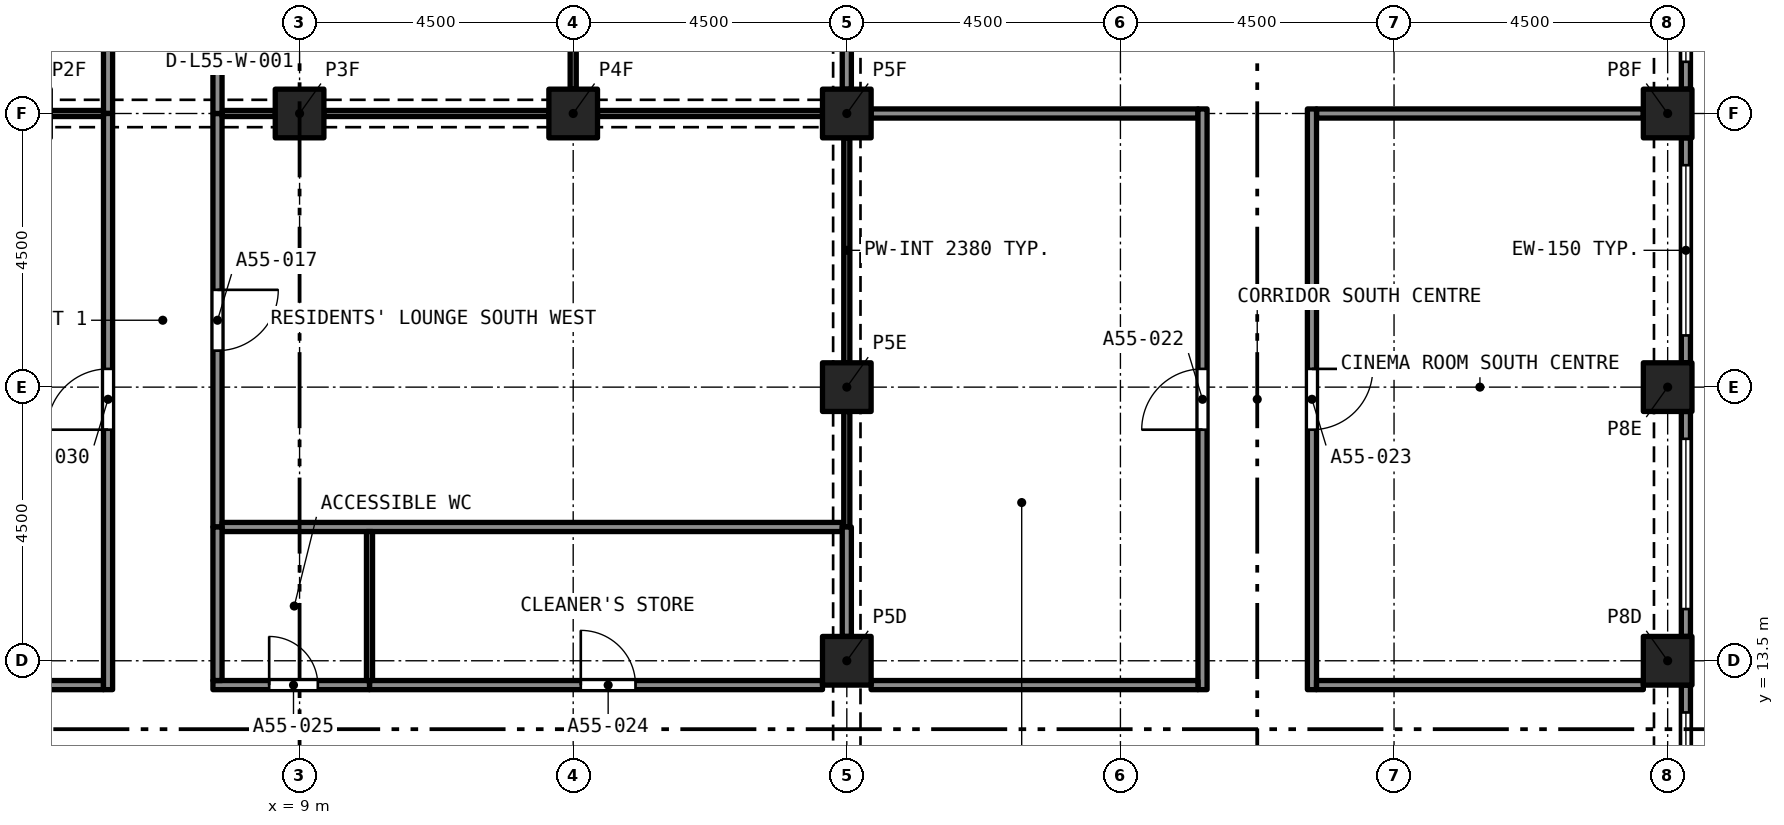
"""IFC4 building model, lengths in metres.
Left out: names, types, materials, properties, quantities, classifications, styles, units other than length and angle.
Written with IfcOpenShell. Run it as: python <this file> out.ifc"""

import sys

from ifc_helpers import new_model, si_unit, direction, frame, frame_2d, origin, origin_2d, place, context, subcontext, project, spatial, rectangle, extrude, element, fill, save


model = new_model("IFC4")
c1 = context("Model", 3, precision=1e-05, world=origin(), true_north=direction((0.0, 1.0)))
c2 = subcontext(c1, "Body", "Model", "MODEL_VIEW")
j1 = project(units=[si_unit("LENGTHUNIT", "METRE"), si_unit("PLANEANGLEUNIT", "RADIAN")], contexts=[c1])
p1 = place(None, origin())
s1 = spatial("IfcSite", under=j1, at=p1, CompositionType="ELEMENT")
p2 = place(p1, origin())
s2 = spatial("IfcBuilding", under=s1, at=p2, CompositionType="ELEMENT")
p3 = place(p2, frame((0.0, 0.0, 198.7)))
s3 = spatial("IfcBuildingStorey", under=s2, at=p3, CompositionType="ELEMENT", Elevation=198.7)
for number, where, z_axis, x_axis in (
    (1, (18.0, 13.5, 0.0), (0.0, 0.0, 1.0), (1.0, 0.0, 0.0)),
    (2, (31.5, 13.5, 0.0), (0.0, 0.0, 1.0), (1.0, 0.0, 0.0)),
    (3, (18.0, 18.0, 0.0), (0.0, 0.0, 1.0), (1.0, 0.0, 0.0)),
    (4, (31.5, 18.0, 0.0), (0.0, 0.0, 1.0), (1.0, 0.0, 0.0)),
    (5, (9.0, 22.5, 0.0), (0.0, 0.0, 1.0), (1.0, 0.0, 0.0)),
    (6, (13.5, 22.5, 0.0), (0.0, 0.0, 1.0), (1.0, 0.0, 0.0)),
    (7, (18.0, 22.5, 0.0), (0.0, 0.0, 1.0), (1.0, 0.0, 0.0)),
    (8, (31.5, 22.5, 0.0), (0.0, 0.0, 1.0), (1.0, 0.0, 0.0)),
):
    element("IfcColumn", number, at=place(p3, frame(where, z_axis=z_axis, x_axis=x_axis)), inside=s3, PredefinedType="COLUMN", context=c2, shape_type="SweptSolid", body=[
        extrude(rectangle(XDim=0.8, YDim=0.8, at=origin_2d()), origin(), (0.0, 0.0, 1.0), 3.2),
    ])
p4 = place(p3, frame((31.8, 13.1, 0.0), z_axis=(0.0, 0.0, 1.0), x_axis=(0.0, -1.0, 0.0)))
e9 = element("IfcWall", 9, at=p4, inside=s3, PredefinedType="SOLIDWALL", context=c2, shape_type="SweptSolid", body=[
    extrude(rectangle(XDim=3.7, YDim=0.15, at=frame_2d((1.85, 0.0))), origin(), (0.0, 0.0, 1.0), 3.2),
])
p5 = place(p4, frame((0.45, 0.0, 0.45)))
e10 = element("IfcOpeningElement", 10, at=p5, cuts=e9, PredefinedType="OPENING", context=c2, shape_type="SweptSolid", body=[
    extrude(rectangle(XDim=2.8, YDim=1.95, at=frame_2d((1.4, 0.975))), frame((0.0, 0.085, 0.0), z_axis=(0.0, -1.0, 0.0), x_axis=(1.0, 0.0, 0.0)), (0.0, 0.0, 1.0), 0.17),
])
p6 = place(p3, frame((31.8, 17.6, 0.0), z_axis=(0.0, 0.0, 1.0), x_axis=(0.0, -1.0, 0.0)))
e11 = element("IfcWall", 11, at=p6, inside=s3, PredefinedType="SOLIDWALL", context=c2, shape_type="SweptSolid", body=[
    extrude(rectangle(XDim=3.7, YDim=0.15, at=frame_2d((1.85, 0.0))), origin(), (0.0, 0.0, 1.0), 3.2),
])
p7 = place(p6, frame((0.45, 0.0, 0.45)))
e12 = element("IfcOpeningElement", 12, at=p7, cuts=e11, PredefinedType="OPENING", context=c2, shape_type="SweptSolid", body=[
    extrude(rectangle(XDim=2.8, YDim=1.95, at=frame_2d((1.4, 0.975))), frame((0.0, 0.085, 0.0), z_axis=(0.0, -1.0, 0.0), x_axis=(1.0, 0.0, 0.0)), (0.0, 0.0, 1.0), 0.17),
])
p8 = place(p3, frame((31.8, 22.1, 0.0), z_axis=(0.0, 0.0, 1.0), x_axis=(0.0, -1.0, 0.0)))
e13 = element("IfcWall", 13, at=p8, inside=s3, PredefinedType="SOLIDWALL", context=c2, shape_type="SweptSolid", body=[
    extrude(rectangle(XDim=3.7, YDim=0.15, at=frame_2d((1.85, 0.0))), origin(), (0.0, 0.0, 1.0), 3.2),
])
p9 = place(p8, frame((0.45, 0.0, 0.45)))
e14 = element("IfcOpeningElement", 14, at=p9, cuts=e13, PredefinedType="OPENING", context=c2, shape_type="SweptSolid", body=[
    extrude(rectangle(XDim=2.8, YDim=1.95, at=frame_2d((1.4, 0.975))), frame((0.0, 0.085, 0.0), z_axis=(0.0, -1.0, 0.0), x_axis=(1.0, 0.0, 0.0)), (0.0, 0.0, 1.0), 0.17),
])
p10 = place(p3, frame((31.8, 26.6, 0.0), z_axis=(0.0, 0.0, 1.0), x_axis=(0.0, -1.0, 0.0)))
e15 = element("IfcWall", 15, at=p10, inside=s3, PredefinedType="SOLIDWALL", context=c2, shape_type="SweptSolid", body=[
    extrude(rectangle(XDim=3.7, YDim=0.15, at=frame_2d((1.85, 0.0))), origin(), (0.0, 0.0, 1.0), 3.2),
])
p11 = place(p10, frame((0.45, 0.0, 0.45)))
e16 = element("IfcOpeningElement", 16, at=p11, cuts=e15, PredefinedType="OPENING", context=c2, shape_type="SweptSolid", body=[
    extrude(rectangle(XDim=2.8, YDim=1.95, at=frame_2d((1.4, 0.975))), frame((0.0, 0.085, 0.0), z_axis=(0.0, -1.0, 0.0), x_axis=(1.0, 0.0, 0.0)), (0.0, 0.0, 1.0), 0.17),
])
p12 = place(p3, frame((18.0, 18.4, 0.0), z_axis=(0.0, 0.0, 1.0), x_axis=(0.0, 1.0, 0.0)))
e17 = element("IfcWall", 17, at=p12, inside=s3, PredefinedType="PARTITIONING", context=c2, shape_type="SweptSolid", body=[
    extrude(rectangle(XDim=3.7, YDim=0.1, at=frame_2d((1.85, 0.0))), origin(), (0.0, 0.0, 1.0), 2.38),
])
p13 = place(p3, frame((18.0, 15.7, 0.0), z_axis=(0.0, 0.0, 1.0), x_axis=(0.0, 1.0, 0.0)))
e18 = element("IfcWall", 18, at=p13, inside=s3, PredefinedType="PARTITIONING", context=c2, shape_type="SweptSolid", body=[
    extrude(rectangle(XDim=1.9, YDim=0.1, at=frame_2d((0.95, 0.0))), origin(), (0.0, 0.0, 1.0), 2.38),
])
p14 = place(p3, frame((7.65, 22.5, 0.0), z_axis=(0.0, 0.0, 1.0), x_axis=(0.0, -1.0, 0.0)))
e19 = element("IfcWall", 19, at=p14, inside=s3, PredefinedType="PARTITIONING", context=c2, shape_type="SweptSolid", body=[
    extrude(rectangle(XDim=6.8, YDim=0.15, at=frame_2d((3.4, 0.0))), origin(), (0.0, 0.0, 1.0), 2.7),
])
p15 = place(p14, frame((2.9, 0.0, 0.0)))
e20 = element("IfcOpeningElement", 20, at=p15, cuts=e19, PredefinedType="OPENING", context=c2, shape_type="SweptSolid", body=[
    extrude(rectangle(XDim=1.0, YDim=2.1, at=frame_2d((0.5, 1.05))), frame((0.0, 0.085, 0.0), z_axis=(0.0, -1.0, 0.0), x_axis=(1.0, 0.0, 0.0)), (0.0, 0.0, 1.0), 0.17),
])
p16 = place(p3, frame((7.725, 22.5, 0.0), z_axis=(0.0, 0.0, 1.0), x_axis=(1.0, 0.0, 0.0)))
e21 = element("IfcWall", 21, at=p16, inside=s3, PredefinedType="PARTITIONING", context=c2, shape_type="SweptSolid", body=[
    extrude(rectangle(XDim=0.875, YDim=0.1, at=frame_2d((0.438, 0.0))), origin(), (0.0, 0.0, 1.0), 2.38),
])
for number, where, z_axis, x_axis in (
    (22, (9.4, 22.5, 0.0), (0.0, 0.0, 1.0), (1.0, 0.0, 0.0)),
    (23, (13.9, 22.5, 0.0), (0.0, 0.0, 1.0), (1.0, 0.0, 0.0)),
):
    element("IfcWall", number, at=place(p3, frame(where, z_axis=z_axis, x_axis=x_axis)), inside=s3, PredefinedType="PARTITIONING", context=c2, shape_type="SweptSolid", body=[
        extrude(rectangle(XDim=3.7, YDim=0.1, at=frame_2d((1.85, 0.0))), origin(), (0.0, 0.0, 1.0), 2.38),
    ])
p17 = place(p3, frame((7.725, 15.7, 0.0), z_axis=(0.0, 0.0, 1.0), x_axis=(1.0, 0.0, 0.0)))
e24 = element("IfcWall", 24, at=p17, inside=s3, PredefinedType="PARTITIONING", context=c2, shape_type="SweptSolid", body=[
    extrude(rectangle(XDim=10.2, YDim=0.15, at=frame_2d((5.1, 0.0))), origin(), (0.0, 0.0, 1.0), 2.7),
])
for number, where, z_axis, x_axis in (
    (25, (18.4, 22.5, 0.0), (0.0, 0.0, 1.0), (1.0, 0.0, 0.0)),
    (26, (25.725, 22.5, 0.0), (0.0, 0.0, 1.0), (1.0, 0.0, 0.0)),
):
    element("IfcWall", number, at=place(p3, frame(where, z_axis=z_axis, x_axis=x_axis)), inside=s3, PredefinedType="PARTITIONING", context=c2, shape_type="SweptSolid", body=[
        extrude(rectangle(XDim=5.375, YDim=0.15, at=frame_2d((2.688, 0.0))), origin(), (0.0, 0.0, 1.0), 2.7),
    ])
p18 = place(p3, frame((18.0, 22.9, 0.0), z_axis=(0.0, 0.0, 1.0), x_axis=(0.0, 1.0, 0.0)))
e27 = element("IfcWall", 27, at=p18, inside=s3, PredefinedType="PARTITIONING", context=c2, shape_type="SweptSolid", body=[
    extrude(rectangle(XDim=3.7, YDim=0.15, at=frame_2d((1.85, 0.0))), origin(), (0.0, 0.0, 1.0), 2.38),
])
p19 = place(p3, frame((23.85, 13.025, 0.0), z_axis=(0.0, 0.0, 1.0), x_axis=(0.0, 1.0, 0.0)))
e28 = element("IfcWall", 28, at=p19, inside=s3, PredefinedType="PARTITIONING", context=c2, shape_type="SweptSolid", body=[
    extrude(rectangle(XDim=9.55, YDim=0.15, at=frame_2d((4.775, 0.0))), origin(), (0.0, 0.0, 1.0), 2.7),
])
p20 = place(p19, frame((4.275, 0.0, 0.0)))
e29 = element("IfcOpeningElement", 29, at=p20, cuts=e28, PredefinedType="OPENING", context=c2, shape_type="SweptSolid", body=[
    extrude(rectangle(XDim=1.0, YDim=2.1, at=frame_2d((0.5, 1.05))), frame((0.0, 0.085, 0.0), z_axis=(0.0, -1.0, 0.0), x_axis=(1.0, 0.0, 0.0)), (0.0, 0.0, 1.0), 0.17),
])
p21 = place(p3, frame((25.65, 22.575, 0.0), z_axis=(0.0, 0.0, 1.0), x_axis=(0.0, -1.0, 0.0)))
e30 = element("IfcWall", 30, at=p21, inside=s3, PredefinedType="PARTITIONING", context=c2, shape_type="SweptSolid", body=[
    extrude(rectangle(XDim=9.55, YDim=0.15, at=frame_2d((4.775, 0.0))), origin(), (0.0, 0.0, 1.0), 2.7),
])
p22 = place(p21, frame((4.275, 0.0, 0.0)))
e31 = element("IfcOpeningElement", 31, at=p22, cuts=e30, PredefinedType="OPENING", context=c2, shape_type="SweptSolid", body=[
    extrude(rectangle(XDim=1.0, YDim=2.1, at=frame_2d((0.5, 1.05))), frame((0.0, 0.085, 0.0), z_axis=(0.0, -1.0, 0.0), x_axis=(1.0, 0.0, 0.0)), (0.0, 0.0, 1.0), 0.17),
])
for number, where, z_axis, x_axis in (
    (32, (18.4, 13.1, 0.0), (0.0, 0.0, 1.0), (1.0, 0.0, 0.0)),
    (33, (25.725, 13.1, 0.0), (0.0, 0.0, 1.0), (1.0, 0.0, 0.0)),
):
    element("IfcWall", number, at=place(p3, frame(where, z_axis=z_axis, x_axis=x_axis)), inside=s3, PredefinedType="PARTITIONING", context=c2, shape_type="SweptSolid", body=[
        extrude(rectangle(XDim=5.375, YDim=0.15, at=frame_2d((2.688, 0.0))), origin(), (0.0, 0.0, 1.0), 2.7),
    ])
p23 = place(p3, frame((10.15, 13.1, 0.0), z_axis=(0.0, 0.0, 1.0), x_axis=(1.0, 0.0, 0.0)))
e34 = element("IfcWall", 34, at=p23, inside=s3, PredefinedType="PARTITIONING", context=c2, shape_type="SweptSolid", body=[
    extrude(rectangle(XDim=7.45, YDim=0.15, at=frame_2d((3.725, 0.0))), origin(), (0.0, 0.0, 1.0), 2.7),
])
p24 = place(p23, frame((3.475, 0.0, 0.0)))
e35 = element("IfcOpeningElement", 35, at=p24, cuts=e34, PredefinedType="OPENING", context=c2, shape_type="SweptSolid", body=[
    extrude(rectangle(XDim=0.9, YDim=2.1, at=frame_2d((0.45, 1.05))), frame((0.0, 0.085, 0.0), z_axis=(0.0, -1.0, 0.0), x_axis=(1.0, 0.0, 0.0)), (0.0, 0.0, 1.0), 0.17),
])
p25 = place(p3, frame((7.575, 13.1, 0.0), z_axis=(0.0, 0.0, 1.0), x_axis=(1.0, 0.0, 0.0)))
e36 = element("IfcWall", 36, at=p25, inside=s3, PredefinedType="PARTITIONING", context=c2, shape_type="SweptSolid", body=[
    extrude(rectangle(XDim=2.575, YDim=0.15, at=frame_2d((1.288, 0.0))), origin(), (0.0, 0.0, 1.0), 2.7),
])
p26 = place(p25, frame((0.925, 0.0, 0.0)))
e37 = element("IfcOpeningElement", 37, at=p26, cuts=e36, PredefinedType="OPENING", context=c2, shape_type="SweptSolid", body=[
    extrude(rectangle(XDim=0.8, YDim=2.1, at=frame_2d((0.4, 1.05))), frame((0.0, 0.085, 0.0), z_axis=(0.0, -1.0, 0.0), x_axis=(1.0, 0.0, 0.0)), (0.0, 0.0, 1.0), 0.17),
])
p27 = place(p3, frame((0.4, 13.1, 0.0), z_axis=(0.0, 0.0, 1.0), x_axis=(1.0, 0.0, 0.0)))
e38 = element("IfcWall", 38, at=p27, inside=s3, PredefinedType="PARTITIONING", context=c2, shape_type="SweptSolid", body=[
    extrude(rectangle(XDim=5.375, YDim=0.15, at=frame_2d((2.688, 0.0))), origin(), (0.0, 0.0, 1.0), 2.7),
])
p28 = place(p3, frame((18.0, 13.9, 0.0), z_axis=(0.0, 0.0, 1.0), x_axis=(0.0, 1.0, 0.0)))
e39 = element("IfcWall", 39, at=p28, inside=s3, PredefinedType="PARTITIONING", context=c2, shape_type="SweptSolid", body=[
    extrude(rectangle(XDim=1.8, YDim=0.15, at=frame_2d((0.9, 0.0))), origin(), (0.0, 0.0, 1.0), 2.38),
])
p29 = place(p3, frame((5.85, 22.5, 0.0), z_axis=(0.0, 0.0, 1.0), x_axis=(0.0, 1.0, 0.0)))
e40 = element("IfcWall", 40, at=p29, inside=s3, PredefinedType="PARTITIONING", context=c2, shape_type="SweptSolid", body=[
    extrude(rectangle(XDim=3.075, YDim=0.15, at=frame_2d((1.538, 0.0))), origin(), (0.0, 0.0, 1.0), 2.7),
])
p30 = place(p3, frame((7.65, 22.5, 0.0), z_axis=(0.0, 0.0, 1.0), x_axis=(0.0, 1.0, 0.0)))
e41 = element("IfcWall", 41, at=p30, inside=s3, PredefinedType="PARTITIONING", context=c2, shape_type="SweptSolid", body=[
    extrude(rectangle(XDim=2.925, YDim=0.15, at=frame_2d((1.462, 0.0))), origin(), (0.0, 0.0, 1.0), 2.7),
])
p31 = place(p3, frame((7.65, 13.175, 0.0), z_axis=(0.0, 0.0, 1.0), x_axis=(0.0, 1.0, 0.0)))
e42 = element("IfcWall", 42, at=p31, inside=s3, PredefinedType="PARTITIONING", context=c2, shape_type="SweptSolid", body=[
    extrude(rectangle(XDim=2.525, YDim=0.15, at=frame_2d((1.262, 0.0))), origin(), (0.0, 0.0, 1.0), 2.7),
])
p32 = place(p3, frame((5.85, 13.025, 0.0), z_axis=(0.0, 0.0, 1.0), x_axis=(0.0, 1.0, 0.0)))
e43 = element("IfcWall", 43, at=p32, inside=s3, PredefinedType="PARTITIONING", context=c2, shape_type="SweptSolid", body=[
    extrude(rectangle(XDim=9.475, YDim=0.15, at=frame_2d((4.738, 0.0))), origin(), (0.0, 0.0, 1.0), 2.7),
])
p33 = place(p32, frame((4.275, 0.0, 0.0)))
e44 = element("IfcOpeningElement", 44, at=p33, cuts=e43, PredefinedType="OPENING", context=c2, shape_type="SweptSolid", body=[
    extrude(rectangle(XDim=1.0, YDim=2.1, at=frame_2d((0.5, 1.05))), frame((0.0, 0.085, 0.0), z_axis=(0.0, -1.0, 0.0), x_axis=(1.0, 0.0, 0.0)), (0.0, 0.0, 1.0), 0.17),
])
p34 = place(p3, frame((4.9, 22.5, 0.0), z_axis=(0.0, 0.0, 1.0), x_axis=(1.0, 0.0, 0.0)))
e45 = element("IfcWall", 45, at=p34, inside=s3, PredefinedType="PARTITIONING", context=c2, shape_type="SweptSolid", body=[
    extrude(rectangle(XDim=0.875, YDim=0.1, at=frame_2d((0.438, 0.0))), origin(), (0.0, 0.0, 1.0), 2.38),
])
p35 = place(p3, frame((13.5, 22.9, 0.0), z_axis=(0.0, 0.0, 1.0), x_axis=(0.0, 1.0, 0.0)))
e46 = element("IfcWall", 46, at=p35, inside=s3, PredefinedType="PARTITIONING", context=c2, shape_type="SweptSolid", body=[
    extrude(rectangle(XDim=2.525, YDim=0.1, at=frame_2d((1.263, 0.0))), origin(), (0.0, 0.0, 1.0), 2.7),
])
p36 = place(p3, frame((10.15, 13.175, 0.0), z_axis=(0.0, 0.0, 1.0), x_axis=(0.0, 1.0, 0.0)))
e47 = element("IfcWall", 47, at=p36, inside=s3, PredefinedType="PARTITIONING", context=c2, shape_type="SweptSolid", body=[
    extrude(rectangle(XDim=2.45, YDim=0.1, at=frame_2d((1.225, 0.0))), origin(), (0.0, 0.0, 1.0), 2.7),
])
p37 = place(p5, origin())
e48 = element("IfcWindow", 48, at=p37, inside=s3, PartitioningType="SINGLE_PANEL", PredefinedType="WINDOW", context=c2, shape_type="SweptSolid", body=[
    extrude(rectangle(XDim=2.8, YDim=1.95, at=frame_2d((1.4, 0.975))), frame((0.0, 0.03, 0.0), z_axis=(0.0, -1.0, 0.0), x_axis=(1.0, 0.0, 0.0)), (0.0, 0.0, 1.0), 0.06),
])
fill(e10, e48)
p38 = place(p7, origin())
e49 = element("IfcWindow", 49, at=p38, inside=s3, PartitioningType="SINGLE_PANEL", PredefinedType="WINDOW", context=c2, shape_type="SweptSolid", body=[
    extrude(rectangle(XDim=2.8, YDim=1.95, at=frame_2d((1.4, 0.975))), frame((0.0, 0.03, 0.0), z_axis=(0.0, -1.0, 0.0), x_axis=(1.0, 0.0, 0.0)), (0.0, 0.0, 1.0), 0.06),
])
fill(e12, e49)
p39 = place(p9, origin())
e50 = element("IfcWindow", 50, at=p39, inside=s3, PartitioningType="SINGLE_PANEL", PredefinedType="WINDOW", context=c2, shape_type="SweptSolid", body=[
    extrude(rectangle(XDim=2.8, YDim=1.95, at=frame_2d((1.4, 0.975))), frame((0.0, 0.03, 0.0), z_axis=(0.0, -1.0, 0.0), x_axis=(1.0, 0.0, 0.0)), (0.0, 0.0, 1.0), 0.06),
])
fill(e14, e50)
p40 = place(p11, origin())
e51 = element("IfcWindow", 51, at=p40, inside=s3, PartitioningType="SINGLE_PANEL", PredefinedType="WINDOW", context=c2, shape_type="SweptSolid", body=[
    extrude(rectangle(XDim=2.8, YDim=1.95, at=frame_2d((1.4, 0.975))), frame((0.0, 0.03, 0.0), z_axis=(0.0, -1.0, 0.0), x_axis=(1.0, 0.0, 0.0)), (0.0, 0.0, 1.0), 0.06),
])
fill(e16, e51)
p41 = place(p15, origin())
e52 = element("IfcDoor", 52, at=p41, inside=s3, OperationType="SINGLE_SWING_LEFT", PredefinedType="DOOR", context=c2, shape_type="SweptSolid", body=[
    extrude(rectangle(XDim=1.0, YDim=2.1, at=frame_2d((0.5, 1.05))), frame((0.0, 0.025, 0.0), z_axis=(0.0, -1.0, 0.0), x_axis=(1.0, 0.0, 0.0)), (0.0, 0.0, 1.0), 0.05),
])
fill(e20, e52)
p42 = place(p20, origin())
e53 = element("IfcDoor", 53, at=p42, inside=s3, OperationType="SINGLE_SWING_RIGHT", PredefinedType="DOOR", context=c2, shape_type="SweptSolid", body=[
    extrude(rectangle(XDim=1.0, YDim=2.1, at=frame_2d((0.5, 1.05))), frame((0.0, 0.025, 0.0), z_axis=(0.0, -1.0, 0.0), x_axis=(1.0, 0.0, 0.0)), (0.0, 0.0, 1.0), 0.05),
])
fill(e29, e53)
p43 = place(p22, origin())
e54 = element("IfcDoor", 54, at=p43, inside=s3, OperationType="SINGLE_SWING_LEFT", PredefinedType="DOOR", context=c2, shape_type="SweptSolid", body=[
    extrude(rectangle(XDim=1.0, YDim=2.1, at=frame_2d((0.5, 1.05))), frame((0.0, 0.025, 0.0), z_axis=(0.0, -1.0, 0.0), x_axis=(1.0, 0.0, 0.0)), (0.0, 0.0, 1.0), 0.05),
])
fill(e31, e54)
p44 = place(p24, origin())
e55 = element("IfcDoor", 55, at=p44, inside=s3, OperationType="SINGLE_SWING_RIGHT", PredefinedType="DOOR", context=c2, shape_type="SweptSolid", body=[
    extrude(rectangle(XDim=0.9, YDim=2.1, at=frame_2d((0.45, 1.05))), frame((0.0, 0.025, 0.0), z_axis=(0.0, -1.0, 0.0), x_axis=(1.0, 0.0, 0.0)), (0.0, 0.0, 1.0), 0.05),
])
fill(e35, e55)
p45 = place(p26, origin())
e56 = element("IfcDoor", 56, at=p45, inside=s3, OperationType="SINGLE_SWING_RIGHT", PredefinedType="DOOR", context=c2, shape_type="SweptSolid", body=[
    extrude(rectangle(XDim=0.8, YDim=2.1, at=frame_2d((0.4, 1.05))), frame((0.0, 0.025, 0.0), z_axis=(0.0, -1.0, 0.0), x_axis=(1.0, 0.0, 0.0)), (0.0, 0.0, 1.0), 0.05),
])
fill(e37, e56)
p46 = place(p33, origin())
e57 = element("IfcDoor", 57, at=p46, inside=s3, OperationType="SINGLE_SWING_RIGHT", PredefinedType="DOOR", context=c2, shape_type="SweptSolid", body=[
    extrude(rectangle(XDim=1.0, YDim=2.1, at=frame_2d((0.5, 1.05))), frame((0.0, 0.025, 0.0), z_axis=(0.0, -1.0, 0.0), x_axis=(1.0, 0.0, 0.0)), (0.0, 0.0, 1.0), 0.05),
])
fill(e44, e57)
save(model, sys.argv[1])
